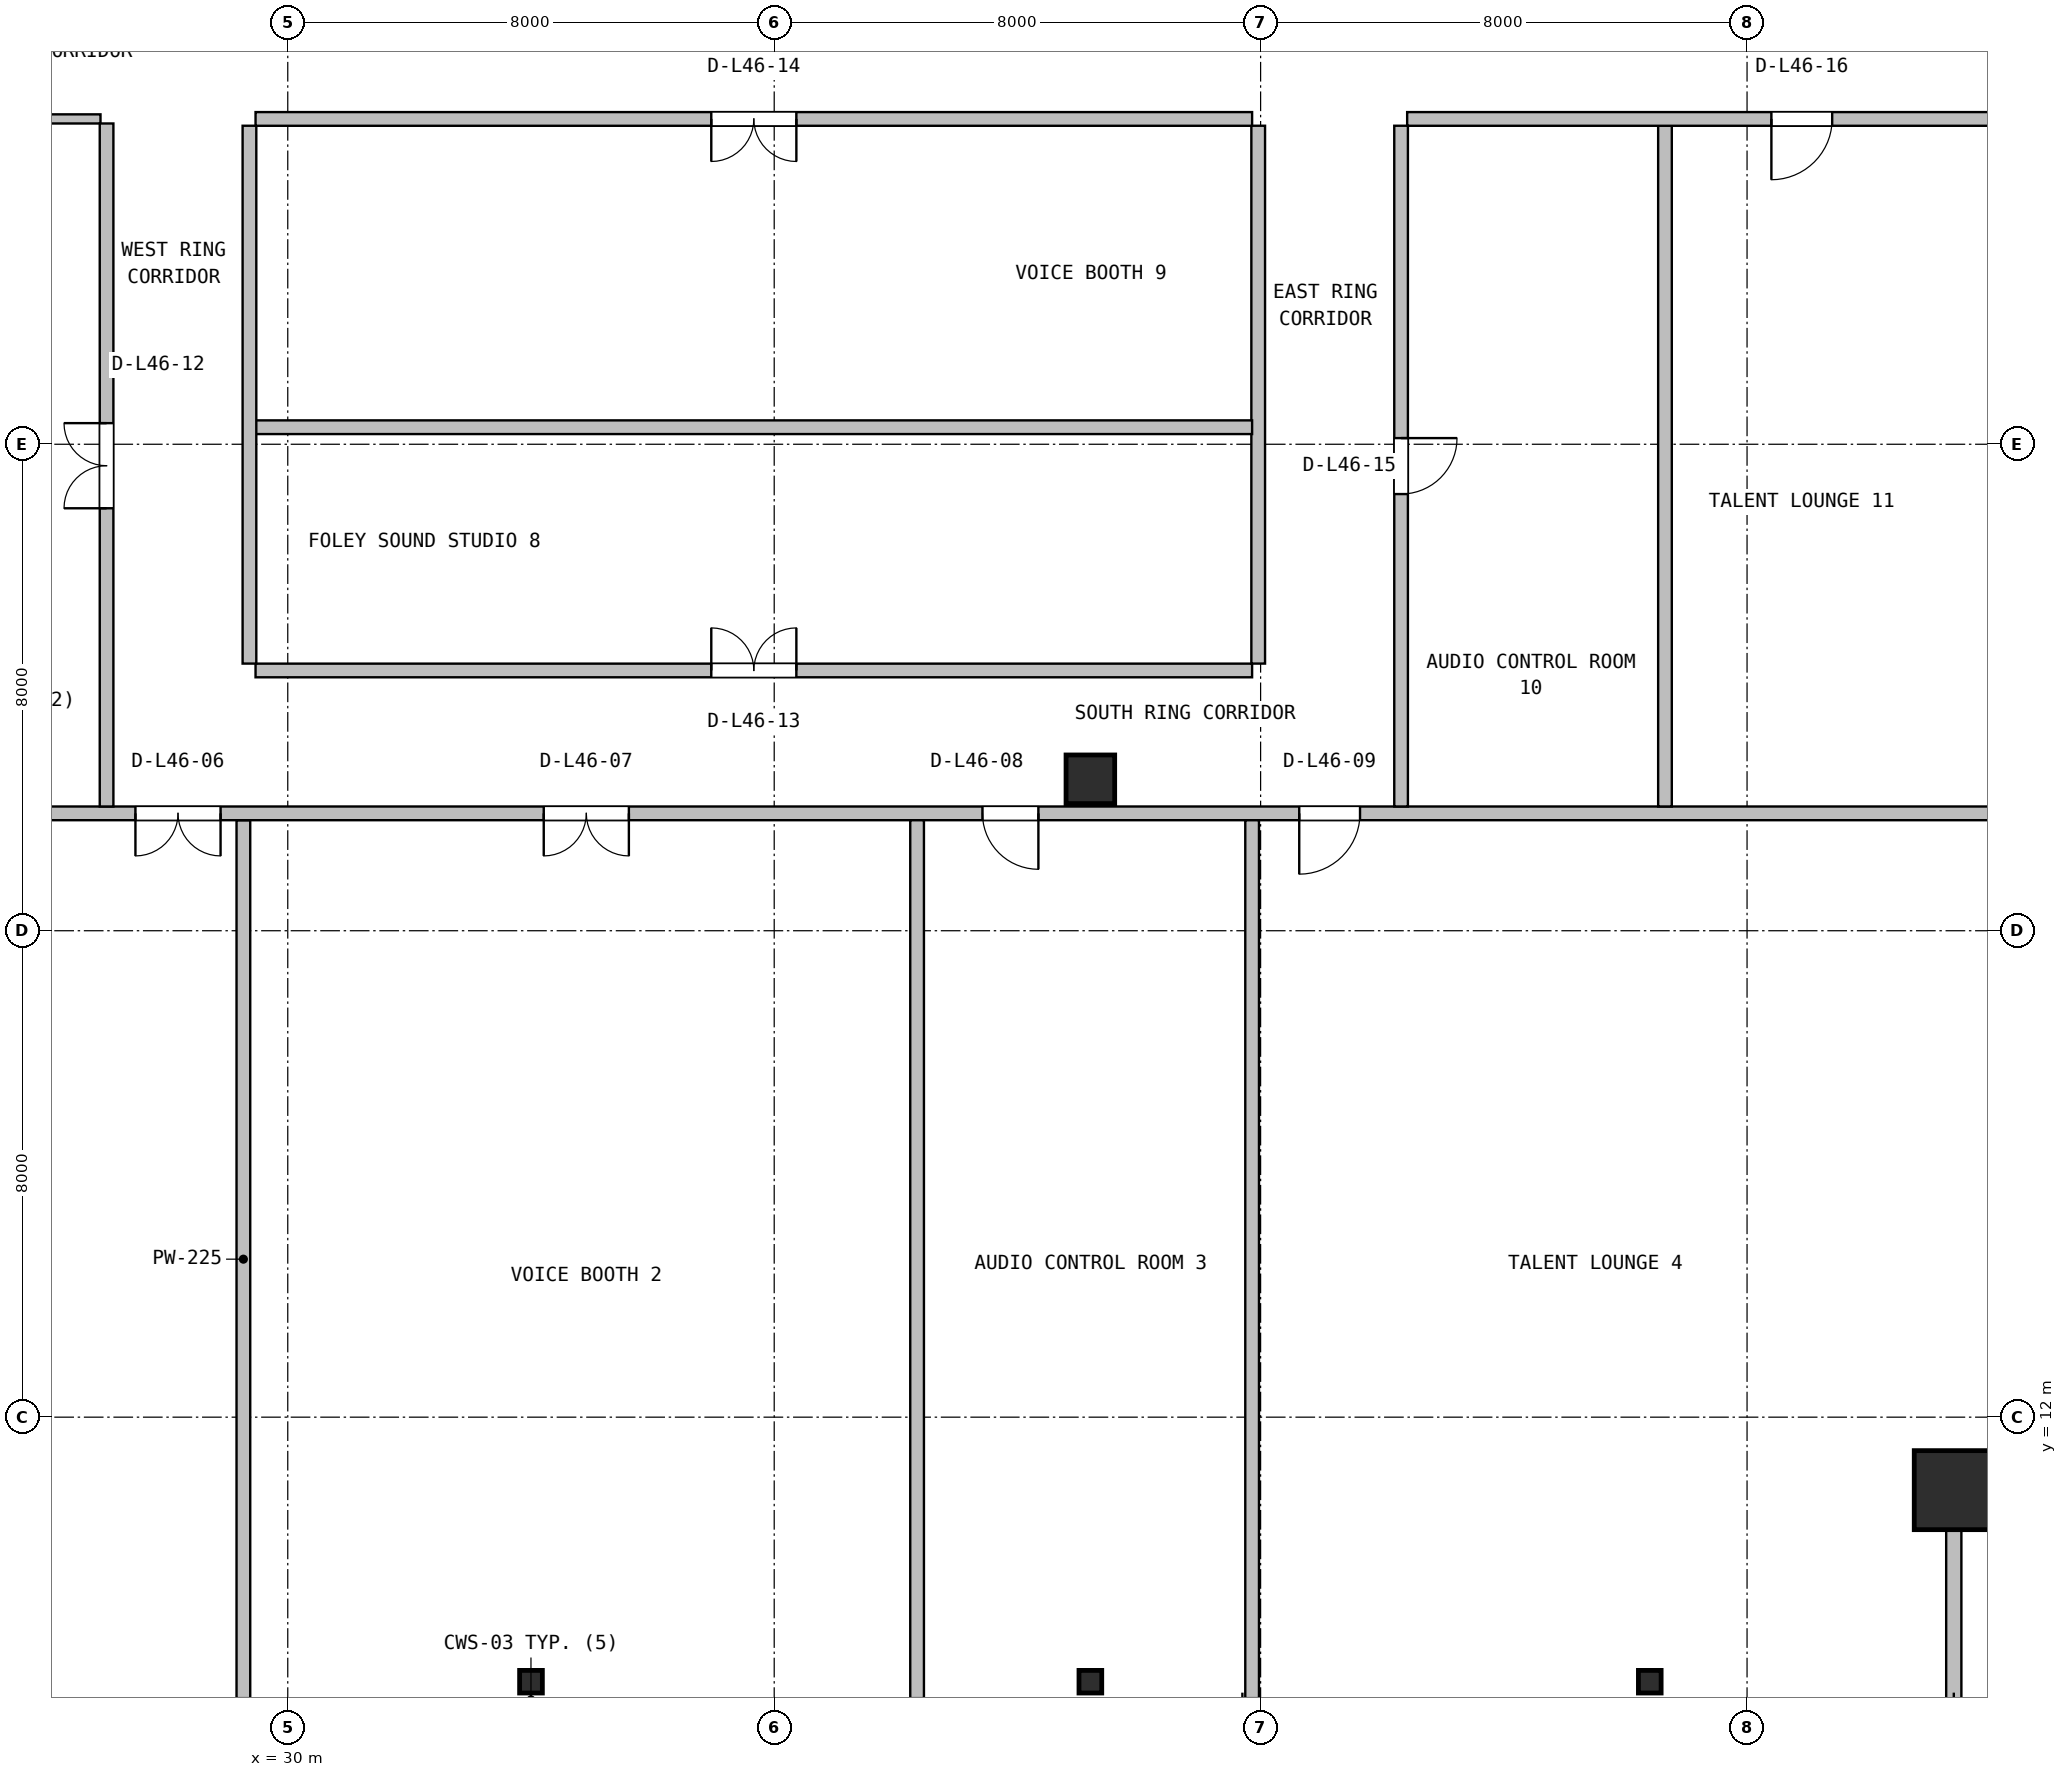
"""IFC4 building model, lengths in metres.
Left out: names, types, materials, properties, quantities, classifications, styles, units other than length and angle.
Written with IfcOpenShell. Run it as: python <this file> out.ifc"""

import sys

from ifc_helpers import new_model, si_unit, direction, frame, frame_2d, origin, origin_2d, place, context, subcontext, project, spatial, rectangle, hollow_rectangle, i_section, extrude, source, transform, mapped, element, fill, save


model = new_model("IFC4")
c1 = context("Model", 3, precision=1e-05, world=origin(), true_north=direction((0.0, 1.0)))
c2 = subcontext(c1, "Body", "Model", "MODEL_VIEW")
j1 = project(units=[si_unit("LENGTHUNIT", "METRE"), si_unit("PLANEANGLEUNIT", "RADIAN")], contexts=[c1])
p1 = place(None, origin())
s1 = spatial("IfcSite", under=j1, at=p1, CompositionType="ELEMENT")
p2 = place(p1, origin())
s2 = spatial("IfcBuilding", under=s1, at=p2, CompositionType="ELEMENT")
p3 = place(p2, frame((0.0, 0.0, 187.6)))
s3 = spatial("IfcBuildingStorey", under=s2, at=p3, CompositionType="ELEMENT", Elevation=187.6)
m1 = source(origin(), c2, "Body", "SweptSolid", [
    extrude(hollow_rectangle(XDim=1.3, YDim=1.3, WallThickness=0.05, at=origin_2d()), origin(), (0.0, 0.0, 1.0), 3.8),
])
p4 = place(p3, frame((57.4, 10.8, 0.0), z_axis=(0.0, 0.0, 1.0), x_axis=(1.0, 0.0, 0.0)))
e1 = element("IfcColumn", 1, at=p4, inside=s3, PredefinedType="COLUMN", context=c2, shape_type="MappedRepresentation", body=[
    mapped(m1, transform((0.0, 0.0, 0.0), x_axis=(1.0, 0.0, 0.0), y_axis=(0.0, 1.0, 0.0), z_axis=(0.0, 0.0, 1.0), scale=1.0)),
])
m2 = source(origin(), c2, "Body", "SweptSolid", [
    extrude(i_section(OverallWidth=0.374, OverallDepth=0.372, WebThickness=0.016, FlangeThickness=0.026, FilletRadius=0.016, at=origin_2d()), origin(), (0.0, 0.0, 1.0), 3.8),
])
for number, where, z_axis, x_axis in (
    (2, (34.0, 7.65, 0.0), (0.0, 0.0, 1.0), (1.0, 0.0, 0.0)),
    (3, (43.2, 7.65, 0.0), (0.0, 0.0, 1.0), (1.0, 0.0, 0.0)),
    (4, (52.4, 7.65, 0.0), (0.0, 0.0, 1.0), (1.0, 0.0, 0.0)),
):
    element("IfcColumn", number, at=place(p3, frame(where, z_axis=z_axis, x_axis=x_axis)), inside=s3, PredefinedType="COLUMN", context=c2, shape_type="MappedRepresentation", body=[
        mapped(m2, transform((0.0, 0.0, 0.0), x_axis=(1.0, 0.0, 0.0), y_axis=(0.0, 1.0, 0.0), z_axis=(0.0, 0.0, 1.0), scale=1.0)),
    ])
m3 = source(origin(), c2, "Body", "SweptSolid", [
    extrude(rectangle(XDim=0.8, YDim=0.8, at=origin_2d()), origin(), (0.0, 0.0, 1.0), 3.8),
])
p5 = place(p3, frame((43.2, 22.49, 0.0), z_axis=(0.0, 0.0, 1.0), x_axis=(1.0, 0.0, 0.0)))
e5 = element("IfcColumn", 5, at=p5, inside=s3, PredefinedType="COLUMN", context=c2, shape_type="MappedRepresentation", body=[
    mapped(m3, transform((0.0, 0.0, 0.0), x_axis=(1.0, 0.0, 0.0), y_axis=(0.0, 1.0, 0.0), z_axis=(0.0, 0.0, 1.0), scale=1.0)),
])
p6 = place(p3, frame((57.4, 7.28, 0.0), z_axis=(0.0, 0.0, 1.0), x_axis=(0.0, 1.0, 0.0)))
e6 = element("IfcWall", 6, at=p6, inside=s3, PredefinedType="SOLIDWALL", context=c2, shape_type="SweptSolid", body=[
    extrude(rectangle(XDim=3.6, YDim=0.25, at=frame_2d((1.8, 0.0))), origin(), (0.0, 0.0, 1.0), 3.078),
])
p7 = place(p3, frame((29.27, 7.38, 0.0), z_axis=(0.0, 0.0, 1.0), x_axis=(0.0, 1.0, 0.0)))
e7 = element("IfcWall", 7, at=p7, inside=s3, PredefinedType="PARTITIONING", context=c2, shape_type="SweptSolid", body=[
    extrude(rectangle(XDim=14.437, YDim=0.225, at=frame_2d((7.219, 0.0))), origin(), (0.0, 0.0, 1.0), 3.078),
])
p8 = place(p3, frame((7.18, 21.93, 0.0), z_axis=(0.0, 0.0, 1.0), x_axis=(1.0, 0.0, 0.0)))
e8 = element("IfcWall", 8, at=p8, inside=s3, PredefinedType="PARTITIONING", context=c2, shape_type="SweptSolid", body=[
    extrude(rectangle(XDim=53.64, YDim=0.225, at=frame_2d((26.82, 0.0))), origin(), (0.0, 0.0, 1.0), 2.879),
])
p9 = place(p8, frame((20.315, 0.0, 0.0)))
e9 = element("IfcOpeningElement", 9, at=p9, cuts=e8, PredefinedType="OPENING", context=c2, shape_type="SweptSolid", body=[
    extrude(rectangle(XDim=1.4, YDim=2.12, at=frame_2d((0.7, 1.06))), frame((0.0, 0.123, 0.0), z_axis=(0.0, -1.0, 0.0), x_axis=(1.0, 0.0, 0.0)), (0.0, 0.0, 1.0), 0.245),
])
p10 = place(p8, frame((27.03, 0.0, 0.0)))
e10 = element("IfcOpeningElement", 10, at=p10, cuts=e8, PredefinedType="OPENING", context=c2, shape_type="SweptSolid", body=[
    extrude(rectangle(XDim=1.4, YDim=2.12, at=frame_2d((0.7, 1.06))), frame((0.0, 0.123, 0.0), z_axis=(0.0, -1.0, 0.0), x_axis=(1.0, 0.0, 0.0)), (0.0, 0.0, 1.0), 0.245),
])
p11 = place(p8, frame((34.245, 0.0, 0.0)))
e11 = element("IfcOpeningElement", 11, at=p11, cuts=e8, PredefinedType="OPENING", context=c2, shape_type="SweptSolid", body=[
    extrude(rectangle(XDim=0.92, YDim=2.08, at=frame_2d((0.46, 1.04))), frame((0.0, 0.123, 0.0), z_axis=(0.0, -1.0, 0.0), x_axis=(1.0, 0.0, 0.0)), (0.0, 0.0, 1.0), 0.245),
])
p12 = place(p8, frame((39.455, 0.0, 0.0)))
e12 = element("IfcOpeningElement", 12, at=p12, cuts=e8, PredefinedType="OPENING", context=c2, shape_type="SweptSolid", body=[
    extrude(rectangle(XDim=1.0, YDim=2.1, at=frame_2d((0.5, 1.05))), frame((0.0, 0.123, 0.0), z_axis=(0.0, -1.0, 0.0), x_axis=(1.0, 0.0, 0.0)), (0.0, 0.0, 1.0), 0.245),
])
for number, where, z_axis, x_axis in (
    (13, (40.35, 7.38, 0.0), (0.0, 0.0, 1.0), (0.0, 1.0, 0.0)),
    (14, (45.86, 7.38, 0.0), (0.0, 0.0, 1.0), (0.0, 1.0, 0.0)),
):
    element("IfcWall", number, at=place(p3, frame(where, z_axis=z_axis, x_axis=x_axis)), inside=s3, PredefinedType="PARTITIONING", context=c2, shape_type="SweptSolid", body=[
        extrude(rectangle(XDim=14.437, YDim=0.225, at=frame_2d((7.219, 0.0))), origin(), (0.0, 0.0, 1.0), 3.078),
    ])
p13 = place(p3, frame((7.18, 33.35, 0.0), z_axis=(0.0, 0.0, 1.0), x_axis=(1.0, 0.0, 0.0)))
e15 = element("IfcWall", 15, at=p13, inside=s3, PredefinedType="PARTITIONING", context=c2, shape_type="SweptSolid", body=[
    extrude(rectangle(XDim=19.74, YDim=0.15, at=frame_2d((9.87, 0.0))), origin(), (0.0, 0.0, 1.0), 2.879),
])
p14 = place(p13, frame((6.755, 0.0, 0.0)))
e16 = element("IfcOpeningElement", 16, at=p14, cuts=e15, PredefinedType="OPENING", context=c2, shape_type="SweptSolid", body=[
    extrude(rectangle(XDim=0.88, YDim=2.06, at=frame_2d((0.44, 1.03))), frame((0.0, 0.085, 0.0), z_axis=(0.0, -1.0, 0.0), x_axis=(1.0, 0.0, 0.0)), (0.0, 0.0, 1.0), 0.17),
])
p15 = place(p13, frame((12.01, 0.0, 0.0)))
e17 = element("IfcOpeningElement", 17, at=p15, cuts=e15, PredefinedType="OPENING", context=c2, shape_type="SweptSolid", body=[
    extrude(rectangle(XDim=1.05, YDim=2.1, at=frame_2d((0.525, 1.05))), frame((0.0, 0.085, 0.0), z_axis=(0.0, -1.0, 0.0), x_axis=(1.0, 0.0, 0.0)), (0.0, 0.0, 1.0), 0.17),
])
p16 = place(p3, frame((27.02, 22.043, 0.0), z_axis=(0.0, 0.0, 1.0), x_axis=(0.0, 1.0, 0.0)))
e18 = element("IfcWall", 18, at=p16, inside=s3, PredefinedType="PARTITIONING", context=c2, shape_type="SweptSolid", body=[
    extrude(rectangle(XDim=11.232, YDim=0.225, at=frame_2d((5.616, 0.0))), origin(), (0.0, 0.0, 1.0), 2.879),
])
p17 = place(p16, frame((4.904, 0.0, 0.0)))
e19 = element("IfcOpeningElement", 19, at=p17, cuts=e18, PredefinedType="OPENING", context=c2, shape_type="SweptSolid", body=[
    extrude(rectangle(XDim=1.4, YDim=2.12, at=frame_2d((0.7, 1.06))), frame((0.0, 0.123, 0.0), z_axis=(0.0, -1.0, 0.0), x_axis=(1.0, 0.0, 0.0)), (0.0, 0.0, 1.0), 0.245),
])
p18 = place(p3, frame((29.47, 24.28, 0.0), z_axis=(0.0, 0.0, 1.0), x_axis=(1.0, 0.0, 0.0)))
e20 = element("IfcWall", 20, at=p18, inside=s3, PredefinedType="PARTITIONING", context=c2, shape_type="SweptSolid", body=[
    extrude(rectangle(XDim=16.39, YDim=0.225, at=frame_2d((8.195, 0.0))), origin(), (0.0, 0.0, 1.0), 2.879),
])
p19 = place(p18, frame((7.495, 0.0, 0.0)))
e21 = element("IfcOpeningElement", 21, at=p19, cuts=e20, PredefinedType="OPENING", context=c2, shape_type="SweptSolid", body=[
    extrude(rectangle(XDim=1.4, YDim=2.12, at=frame_2d((0.7, 1.06))), frame((0.0, 0.123, 0.0), z_axis=(0.0, -1.0, 0.0), x_axis=(1.0, 0.0, 0.0)), (0.0, 0.0, 1.0), 0.245),
])
p20 = place(p3, frame((45.96, 24.393, 0.0), z_axis=(0.0, 0.0, 1.0), x_axis=(0.0, 1.0, 0.0)))
e22 = element("IfcWall", 22, at=p20, inside=s3, PredefinedType="PARTITIONING", context=c2, shape_type="SweptSolid", body=[
    extrude(rectangle(XDim=8.845, YDim=0.225, at=frame_2d((4.422, 0.0))), origin(), (0.0, 0.0, 1.0), 3.192),
])
p21 = place(p3, frame((29.47, 28.28, 0.0), z_axis=(0.0, 0.0, 1.0), x_axis=(1.0, 0.0, 0.0)))
e23 = element("IfcWall", 23, at=p21, inside=s3, PredefinedType="PARTITIONING", context=c2, shape_type="SweptSolid", body=[
    extrude(rectangle(XDim=16.39, YDim=0.225, at=frame_2d((8.195, 0.0))), origin(), (0.0, 0.0, 1.0), 2.879),
])
p22 = place(p3, frame((29.37, 24.393, 0.0), z_axis=(0.0, 0.0, 1.0), x_axis=(0.0, 1.0, 0.0)))
e24 = element("IfcWall", 24, at=p22, inside=s3, PredefinedType="PARTITIONING", context=c2, shape_type="SweptSolid", body=[
    extrude(rectangle(XDim=8.845, YDim=0.225, at=frame_2d((4.422, 0.0))), origin(), (0.0, 0.0, 1.0), 3.192),
])
p23 = place(p3, frame((29.47, 33.35, 0.0), z_axis=(0.0, 0.0, 1.0), x_axis=(1.0, 0.0, 0.0)))
e25 = element("IfcWall", 25, at=p23, inside=s3, PredefinedType="PARTITIONING", context=c2, shape_type="SweptSolid", body=[
    extrude(rectangle(XDim=16.39, YDim=0.225, at=frame_2d((8.195, 0.0))), origin(), (0.0, 0.0, 1.0), 2.879),
])
p24 = place(p23, frame((7.495, 0.0, 0.0)))
e26 = element("IfcOpeningElement", 26, at=p24, cuts=e25, PredefinedType="OPENING", context=c2, shape_type="SweptSolid", body=[
    extrude(rectangle(XDim=1.4, YDim=2.12, at=frame_2d((0.7, 1.06))), frame((0.0, 0.123, 0.0), z_axis=(0.0, -1.0, 0.0), x_axis=(1.0, 0.0, 0.0)), (0.0, 0.0, 1.0), 0.245),
])
p25 = place(p3, frame((52.65, 22.043, 0.0), z_axis=(0.0, 0.0, 1.0), x_axis=(0.0, 1.0, 0.0)))
e27 = element("IfcWall", 27, at=p25, inside=s3, PredefinedType="PARTITIONING", context=c2, shape_type="SweptSolid", body=[
    extrude(rectangle(XDim=11.195, YDim=0.225, at=frame_2d((5.598, 0.0))), origin(), (0.0, 0.0, 1.0), 3.192),
])
p26 = place(p3, frame((48.41, 33.35, 0.0), z_axis=(0.0, 0.0, 1.0), x_axis=(1.0, 0.0, 0.0)))
e28 = element("IfcWall", 28, at=p26, inside=s3, PredefinedType="PARTITIONING", context=c2, shape_type="SweptSolid", body=[
    extrude(rectangle(XDim=12.41, YDim=0.225, at=frame_2d((6.205, 0.0))), origin(), (0.0, 0.0, 1.0), 3.078),
])
p27 = place(p26, frame((5.99, 0.0, 0.0)))
e29 = element("IfcOpeningElement", 29, at=p27, cuts=e28, PredefinedType="OPENING", context=c2, shape_type="SweptSolid", body=[
    extrude(rectangle(XDim=1.0, YDim=2.1, at=frame_2d((0.5, 1.05))), frame((0.0, 0.123, 0.0), z_axis=(0.0, -1.0, 0.0), x_axis=(1.0, 0.0, 0.0)), (0.0, 0.0, 1.0), 0.245),
])
p28 = place(p3, frame((48.31, 22.043, 0.0), z_axis=(0.0, 0.0, 1.0), x_axis=(0.0, 1.0, 0.0)))
e30 = element("IfcWall", 30, at=p28, inside=s3, PredefinedType="PARTITIONING", context=c2, shape_type="SweptSolid", body=[
    extrude(rectangle(XDim=11.195, YDim=0.225, at=frame_2d((5.598, 0.0))), origin(), (0.0, 0.0, 1.0), 3.192),
])
p29 = place(p28, frame((5.138, 0.0, 0.0)))
e31 = element("IfcOpeningElement", 31, at=p29, cuts=e30, PredefinedType="OPENING", context=c2, shape_type="SweptSolid", body=[
    extrude(rectangle(XDim=0.92, YDim=2.08, at=frame_2d((0.46, 1.04))), frame((0.0, 0.123, 0.0), z_axis=(0.0, -1.0, 0.0), x_axis=(1.0, 0.0, 0.0)), (0.0, 0.0, 1.0), 0.245),
])
m4 = source(origin(), c2, "Body", "SweptSolid", [
    extrude(rectangle(XDim=1.4, YDim=2.12, at=frame_2d((0.7, 1.06))), frame((0.0, 0.025, 0.0), z_axis=(0.0, -1.0, 0.0), x_axis=(1.0, 0.0, 0.0)), (0.0, 0.0, 1.0), 0.05),
])
p30 = place(p9, frame((1.4, 0.0, 0.0), z_axis=(0.0, 0.0, 1.0), x_axis=(-1.0, 0.0, 0.0)))
e32 = element("IfcDoor", 32, at=p30, inside=s3, OperationType="DOUBLE_DOOR_SINGLE_SWING", PredefinedType="DOOR", context=c2, shape_type="MappedRepresentation", body=[
    mapped(m4, transform((0.0, 0.0, 0.0), x_axis=(1.0, 0.0, 0.0), y_axis=(0.0, 1.0, 0.0), z_axis=(0.0, 0.0, 1.0), scale=1.0)),
])
fill(e9, e32)
p31 = place(p10, frame((1.4, 0.0, 0.0), z_axis=(0.0, 0.0, 1.0), x_axis=(-1.0, 0.0, 0.0)))
e33 = element("IfcDoor", 33, at=p31, inside=s3, OperationType="DOUBLE_DOOR_SINGLE_SWING", PredefinedType="DOOR", context=c2, shape_type="MappedRepresentation", body=[
    mapped(m4, transform((0.0, 0.0, 0.0), x_axis=(1.0, 0.0, 0.0), y_axis=(0.0, 1.0, 0.0), z_axis=(0.0, 0.0, 1.0), scale=1.0)),
])
fill(e10, e33)
m5 = source(origin(), c2, "Body", "SweptSolid", [
    extrude(rectangle(XDim=0.92, YDim=2.08, at=frame_2d((0.46, 1.04))), frame((0.0, 0.025, 0.0), z_axis=(0.0, -1.0, 0.0), x_axis=(1.0, 0.0, 0.0)), (0.0, 0.0, 1.0), 0.05),
])
p32 = place(p11, frame((0.92, 0.0, 0.0), z_axis=(0.0, 0.0, 1.0), x_axis=(-1.0, 0.0, 0.0)))
e34 = element("IfcDoor", 34, at=p32, inside=s3, OperationType="SINGLE_SWING_RIGHT", PredefinedType="DOOR", context=c2, shape_type="MappedRepresentation", body=[
    mapped(m5, transform((0.0, 0.0, 0.0), x_axis=(1.0, 0.0, 0.0), y_axis=(0.0, 1.0, 0.0), z_axis=(0.0, 0.0, 1.0), scale=1.0)),
])
fill(e11, e34)
m6 = source(origin(), c2, "Body", "SweptSolid", [
    extrude(rectangle(XDim=1.0, YDim=2.1, at=frame_2d((0.5, 1.05))), frame((0.0, 0.025, 0.0), z_axis=(0.0, -1.0, 0.0), x_axis=(1.0, 0.0, 0.0)), (0.0, 0.0, 1.0), 0.05),
])
p33 = place(p12, frame((1.0, 0.0, 0.0), z_axis=(0.0, 0.0, 1.0), x_axis=(-1.0, 0.0, 0.0)))
e35 = element("IfcDoor", 35, at=p33, inside=s3, OperationType="SINGLE_SWING_LEFT", PredefinedType="DOOR", context=c2, shape_type="MappedRepresentation", body=[
    mapped(m6, transform((0.0, 0.0, 0.0), x_axis=(1.0, 0.0, 0.0), y_axis=(0.0, 1.0, 0.0), z_axis=(0.0, 0.0, 1.0), scale=1.0)),
])
fill(e12, e35)
p34 = place(p17, origin())
e36 = element("IfcDoor", 36, at=p34, inside=s3, OperationType="DOUBLE_DOOR_SINGLE_SWING", PredefinedType="DOOR", context=c2, shape_type="MappedRepresentation", body=[
    mapped(m4, transform((0.0, 0.0, 0.0), x_axis=(1.0, 0.0, 0.0), y_axis=(0.0, 1.0, 0.0), z_axis=(0.0, 0.0, 1.0), scale=1.0)),
])
fill(e19, e36)
p35 = place(p19, origin())
e37 = element("IfcDoor", 37, at=p35, inside=s3, OperationType="DOUBLE_DOOR_SINGLE_SWING", PredefinedType="DOOR", context=c2, shape_type="MappedRepresentation", body=[
    mapped(m4, transform((0.0, 0.0, 0.0), x_axis=(1.0, 0.0, 0.0), y_axis=(0.0, 1.0, 0.0), z_axis=(0.0, 0.0, 1.0), scale=1.0)),
])
fill(e21, e37)
p36 = place(p24, frame((1.4, 0.0, 0.0), z_axis=(0.0, 0.0, 1.0), x_axis=(-1.0, 0.0, 0.0)))
e38 = element("IfcDoor", 38, at=p36, inside=s3, OperationType="DOUBLE_DOOR_SINGLE_SWING", PredefinedType="DOOR", context=c2, shape_type="MappedRepresentation", body=[
    mapped(m4, transform((0.0, 0.0, 0.0), x_axis=(1.0, 0.0, 0.0), y_axis=(0.0, 1.0, 0.0), z_axis=(0.0, 0.0, 1.0), scale=1.0)),
])
fill(e26, e38)
p37 = place(p29, frame((0.92, 0.0, 0.0), z_axis=(0.0, 0.0, 1.0), x_axis=(-1.0, 0.0, 0.0)))
e39 = element("IfcDoor", 39, at=p37, inside=s3, OperationType="SINGLE_SWING_RIGHT", PredefinedType="DOOR", context=c2, shape_type="MappedRepresentation", body=[
    mapped(m5, transform((0.0, 0.0, 0.0), x_axis=(1.0, 0.0, 0.0), y_axis=(0.0, 1.0, 0.0), z_axis=(0.0, 0.0, 1.0), scale=1.0)),
])
fill(e31, e39)
p38 = place(p27, frame((1.0, 0.0, 0.0), z_axis=(0.0, 0.0, 1.0), x_axis=(-1.0, 0.0, 0.0)))
e40 = element("IfcDoor", 40, at=p38, inside=s3, OperationType="SINGLE_SWING_LEFT", PredefinedType="DOOR", context=c2, shape_type="MappedRepresentation", body=[
    mapped(m6, transform((0.0, 0.0, 0.0), x_axis=(1.0, 0.0, 0.0), y_axis=(0.0, 1.0, 0.0), z_axis=(0.0, 0.0, 1.0), scale=1.0)),
])
fill(e29, e40)
save(model, sys.argv[1])
